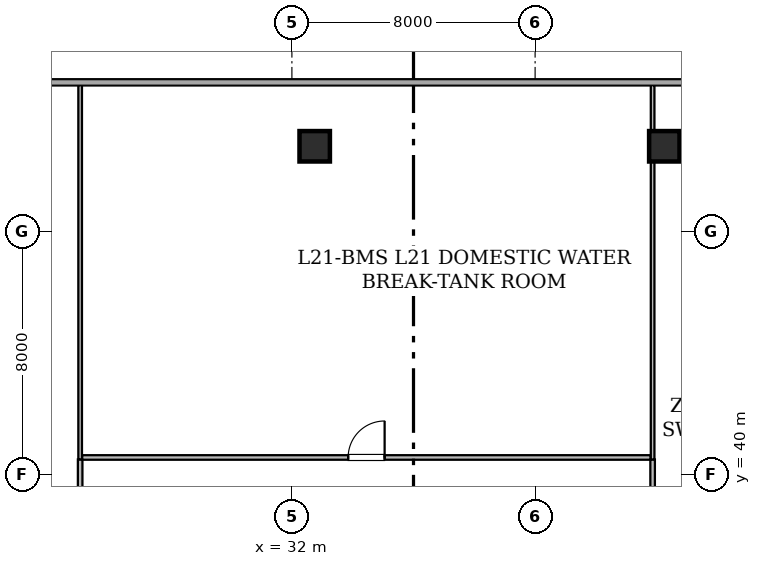
"""IFC4 building model, lengths in metres.
Left out: names, types, materials, properties, quantities, classifications, styles, units other than length and angle.
Written with IfcOpenShell. Run it as: python <this file> out.ifc"""

import sys

from ifc_helpers import new_model, si_unit, direction, frame, frame_2d, origin, origin_2d, place, context, subcontext, project, spatial, rectangle, hollow_rectangle, extrude, element, fill, save


model = new_model("IFC4")
c1 = context("Model", 3, precision=1e-05, world=origin(), true_north=direction((0.0, 1.0)))
c2 = subcontext(c1, "Body", "Model", "MODEL_VIEW")
j1 = project(units=[si_unit("LENGTHUNIT", "METRE"), si_unit("PLANEANGLEUNIT", "RADIAN")], contexts=[c1])
p1 = place(None, origin())
s1 = spatial("IfcSite", under=j1, at=p1, CompositionType="ELEMENT")
p2 = place(p1, origin())
s2 = spatial("IfcBuilding", under=s1, at=p2, CompositionType="ELEMENT")
p3 = place(p2, frame((0.0, 0.0, 84.4)))
s3 = spatial("IfcBuildingStorey", under=s2, at=p3, CompositionType="ELEMENT", Elevation=84.4)
for number, where, z_axis, x_axis in (
    (1, (32.75, 50.8, 0.0), (0.0, 0.0, 1.0), (1.0, 0.0, 0.0)),
    (2, (44.25, 50.8, 0.0), (0.0, 0.0, 1.0), (1.0, 0.0, 0.0)),
):
    element("IfcColumn", number, at=place(p3, frame(where, z_axis=z_axis, x_axis=x_axis)), inside=s3, PredefinedType="COLUMN", context=c2, shape_type="SweptSolid", body=[
        extrude(hollow_rectangle(XDim=1.0, YDim=1.0, WallThickness=0.05, at=origin_2d()), origin(), (0.0, 0.0, 1.0), 5.375),
    ])
p4 = place(p3, frame((8.302, 52.9, 0.0), z_axis=(0.0, 0.0, 1.0), x_axis=(1.0, 0.0, 0.0)))
e3 = element("IfcWall", 3, at=p4, inside=s3, PredefinedType="STANDARD", context=c2, shape_type="SweptSolid", body=[
    extrude(rectangle(XDim=37.457, YDim=0.2, at=frame_2d((18.729, 0.0))), origin(), (0.0, 0.0, 1.0), 1.15),
])
p5 = place(p3, frame((25.035, 29.314, 0.0), z_axis=(0.0, 0.0, 1.0), x_axis=(0.0, 1.0, 0.0)))
e4 = element("IfcWall", 4, at=p5, inside=s3, PredefinedType="STANDARD", context=c2, shape_type="SweptSolid", body=[
    extrude(rectangle(XDim=11.186, YDim=0.15, at=frame_2d((5.593, 0.0))), origin(), (0.0, 0.0, 1.0), 3.42),
])
p6 = place(p5, frame((4.993, 0.0, 0.0)))
e5 = element("IfcOpeningElement", 5, at=p6, cuts=e4, PredefinedType="OPENING", context=c2, shape_type="SweptSolid", body=[
    extrude(rectangle(XDim=1.2, YDim=2.15, at=frame_2d((0.6, 1.075))), frame((0.0, 0.085, 0.0), z_axis=(0.0, -1.0, 0.0), x_axis=(1.0, 0.0, 0.0)), (0.0, 0.0, 1.0), 0.17),
])
p7 = place(p3, frame((43.865, 40.5, 0.0), z_axis=(0.0, 0.0, 1.0), x_axis=(0.0, -1.0, 0.0)))
e6 = element("IfcWall", 6, at=p7, inside=s3, PredefinedType="STANDARD", context=c2, shape_type="SweptSolid", body=[
    extrude(rectangle(XDim=11.186, YDim=0.15, at=frame_2d((5.593, 0.0))), origin(), (0.0, 0.0, 1.0), 3.42),
])
p8 = place(p7, frame((4.993, 0.0, 0.0)))
e7 = element("IfcOpeningElement", 7, at=p8, cuts=e6, PredefinedType="OPENING", context=c2, shape_type="SweptSolid", body=[
    extrude(rectangle(XDim=1.2, YDim=2.15, at=frame_2d((0.6, 1.075))), frame((0.0, 0.085, 0.0), z_axis=(0.0, -1.0, 0.0), x_axis=(1.0, 0.0, 0.0)), (0.0, 0.0, 1.0), 0.17),
])
p9 = place(p3, frame((25.1, 40.565, 0.0), z_axis=(0.0, 0.0, 1.0), x_axis=(1.0, 0.0, 0.0)))
e8 = element("IfcWall", 8, at=p9, inside=s3, PredefinedType="STANDARD", context=c2, shape_type="SweptSolid", body=[
    extrude(rectangle(XDim=18.7, YDim=0.15, at=frame_2d((9.35, 0.0))), origin(), (0.0, 0.0, 1.0), 3.42),
])
p10 = place(p9, frame((8.75, 0.0, 0.0)))
e9 = element("IfcOpeningElement", 9, at=p10, cuts=e8, PredefinedType="OPENING", context=c2, shape_type="SweptSolid", body=[
    extrude(rectangle(XDim=1.2, YDim=2.15, at=frame_2d((0.6, 1.075))), frame((0.0, 0.085, 0.0), z_axis=(0.0, -1.0, 0.0), x_axis=(1.0, 0.0, 0.0)), (0.0, 0.0, 1.0), 0.17),
])
for number, where, z_axis, x_axis in (
    (10, (25.035, 52.808, 0.0), (0.0, 0.0, 1.0), (0.0, -1.0, 0.0)),
    (11, (43.865, 40.5, 0.0), (0.0, 0.0, 1.0), (0.0, 1.0, 0.0)),
):
    element("IfcWall", number, at=place(p3, frame(where, z_axis=z_axis, x_axis=x_axis)), inside=s3, PredefinedType="PARTITIONING", context=c2, shape_type="SweptSolid", body=[
        extrude(rectangle(XDim=12.308, YDim=0.12, at=frame_2d((6.154, 0.0))), origin(), (0.0, 0.0, 1.0), 3.42),
    ])
p11 = place(p10, origin())
e12 = element("IfcDoor", 12, at=p11, inside=s3, OperationType="SINGLE_SWING_RIGHT", PredefinedType="DOOR", context=c2, shape_type="SweptSolid", body=[
    extrude(rectangle(XDim=1.2, YDim=2.15, at=frame_2d((0.6, 1.075))), frame((0.0, 0.025, 0.0), z_axis=(0.0, -1.0, 0.0), x_axis=(1.0, 0.0, 0.0)), (0.0, 0.0, 1.0), 0.05),
])
fill(e9, e12)
save(model, sys.argv[1])
